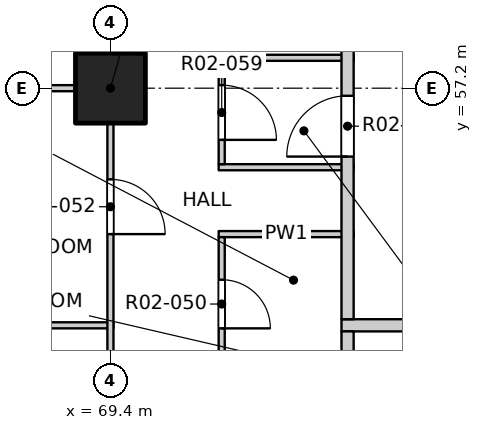
"""IFC4 building model, lengths in metres.
Left out: names, types, materials, properties, quantities, classifications, styles, units other than length and angle.
Written with IfcOpenShell. Run it as: python <this file> out.ifc"""

import sys

from ifc_helpers import new_model, si_unit, direction, frame, frame_2d, origin, origin_2d, place, context, subcontext, project, spatial, rectangle, extrude, element, fill, save


model = new_model("IFC4")
c1 = context("Model", 3, precision=1e-05, world=origin(), true_north=direction((0.0, 1.0)))
c2 = subcontext(c1, "Body", "Model", "MODEL_VIEW")
j1 = project(units=[si_unit("LENGTHUNIT", "METRE"), si_unit("PLANEANGLEUNIT", "RADIAN")], contexts=[c1])
p1 = place(None, origin())
s1 = spatial("IfcSite", under=j1, at=p1, CompositionType="ELEMENT")
p2 = place(p1, origin())
s2 = spatial("IfcBuilding", under=s1, at=p2, CompositionType="ELEMENT")
p3 = place(p2, frame((0.0, 0.0, 36.5)))
s3 = spatial("IfcBuildingStorey", under=s2, at=p3, CompositionType="ELEMENT", Elevation=36.5)
p4 = place(p3, frame((69.4, 57.2, -0.25), z_axis=(0.0, 0.0, 1.0), x_axis=(1.0, 0.0, 0.0)))
e1 = element("IfcColumn", 1, at=p4, inside=s3, PredefinedType="COLUMN", context=c2, shape_type="SweptSolid", body=[
    extrude(rectangle(XDim=1.15, YDim=1.15, at=origin_2d()), origin(), (0.0, 0.0, 1.0), 3.4),
])
p5 = place(p3, frame((61.9, 53.3, 0.0), z_axis=(0.0, 0.0, 1.0), x_axis=(1.0, 0.0, 0.0)))
e2 = element("IfcWall", 2, at=p5, inside=s3, PredefinedType="PARTITIONING", context=c2, shape_type="SweptSolid", body=[
    extrude(rectangle(XDim=7.55, YDim=0.1, at=frame_2d((3.775, 0.0))), origin(), (0.0, 0.0, 1.0), 3.15),
])
p6 = place(p3, frame((73.2, 53.3, 0.0), z_axis=(0.0, 0.0, 1.0), x_axis=(1.0, 0.0, 0.0)))
e3 = element("IfcWall", 3, at=p6, inside=s3, PredefinedType="PARTITIONING", context=c2, shape_type="SweptSolid", body=[
    extrude(rectangle(XDim=23.6, YDim=0.2, at=frame_2d((11.8, 0.0))), origin(), (0.0, 0.0, 1.0), 3.15),
])
p7 = place(p6, frame((5.925, 0.0, 0.0)))
e4 = element("IfcOpeningElement", 4, at=p7, cuts=e3, PredefinedType="OPENING", context=c2, shape_type="SweptSolid", body=[
    extrude(rectangle(XDim=1.0, YDim=2.1, at=frame_2d((0.5, 1.05))), frame((0.0, 0.11, 0.0), z_axis=(0.0, -1.0, 0.0), x_axis=(1.0, 0.0, 0.0)), (0.0, 0.0, 1.0), 0.22),
])
p8 = place(p6, frame((17.925, 0.0, 0.0)))
e5 = element("IfcOpeningElement", 5, at=p8, cuts=e3, PredefinedType="OPENING", context=c2, shape_type="SweptSolid", body=[
    extrude(rectangle(XDim=1.0, YDim=2.1, at=frame_2d((0.5, 1.05))), frame((0.0, 0.11, 0.0), z_axis=(0.0, -1.0, 0.0), x_axis=(1.0, 0.0, 0.0)), (0.0, 0.0, 1.0), 0.22),
])
for number, where, z_axis, x_axis in (
    (6, (71.18, 54.8, 0.0), (0.0, 0.0, 1.0), (1.0, 0.0, 0.0)),
    (7, (71.18, 55.9, 0.0), (0.0, 0.0, 1.0), (1.0, 0.0, 0.0)),
):
    element("IfcWall", number, at=place(p3, frame(where, z_axis=z_axis, x_axis=x_axis)), inside=s3, PredefinedType="PARTITIONING", context=c2, shape_type="SweptSolid", body=[
        extrude(rectangle(XDim=2.22, YDim=0.1, at=frame_2d((1.11, 0.0))), origin(), (0.0, 0.0, 1.0), 3.15),
    ])
p9 = place(p3, frame((61.9, 57.2, 0.0), z_axis=(0.0, 0.0, 1.0), x_axis=(1.0, 0.0, 0.0)))
e8 = element("IfcWall", 8, at=p9, inside=s3, PredefinedType="PARTITIONING", context=c2, shape_type="SweptSolid", body=[
    extrude(rectangle(XDim=7.55, YDim=0.1, at=frame_2d((3.775, 0.0))), origin(), (0.0, 0.0, 1.0), 2.55),
])
p10 = place(p3, frame((71.18, 57.7, 0.0), z_axis=(0.0, 0.0, 1.0), x_axis=(1.0, 0.0, 0.0)))
e9 = element("IfcWall", 9, at=p10, inside=s3, PredefinedType="PARTITIONING", context=c2, shape_type="SweptSolid", body=[
    extrude(rectangle(XDim=2.22, YDim=0.1, at=frame_2d((1.11, 0.0))), origin(), (0.0, 0.0, 1.0), 3.15),
])
p11 = place(p3, frame((69.4, 41.9, 0.0), z_axis=(0.0, 0.0, 1.0), x_axis=(0.0, 1.0, 0.0)))
e10 = element("IfcWall", 10, at=p11, inside=s3, PredefinedType="PARTITIONING", context=c2, shape_type="SweptSolid", body=[
    extrude(rectangle(XDim=46.2, YDim=0.1, at=frame_2d((23.1, 0.0))), origin(), (0.0, 0.0, 1.0), 3.15),
])
p12 = place(p11, frame((1.2, 0.0, 0.0)))
e11 = element("IfcOpeningElement", 11, at=p12, cuts=e10, PredefinedType="OPENING", context=c2, shape_type="SweptSolid", body=[
    extrude(rectangle(XDim=0.9, YDim=2.1, at=frame_2d((0.45, 1.05))), frame((0.0, 0.06, 0.0), z_axis=(0.0, -1.0, 0.0), x_axis=(1.0, 0.0, 0.0)), (0.0, 0.0, 1.0), 0.12),
])
p13 = place(p11, frame((5.1, 0.0, 0.0)))
e12 = element("IfcOpeningElement", 12, at=p13, cuts=e10, PredefinedType="OPENING", context=c2, shape_type="SweptSolid", body=[
    extrude(rectangle(XDim=0.9, YDim=2.1, at=frame_2d((0.45, 1.05))), frame((0.0, 0.06, 0.0), z_axis=(0.0, -1.0, 0.0), x_axis=(1.0, 0.0, 0.0)), (0.0, 0.0, 1.0), 0.12),
])
p14 = place(p11, frame((9.975, 0.0, 0.0)))
e13 = element("IfcOpeningElement", 13, at=p14, cuts=e10, PredefinedType="OPENING", context=c2, shape_type="SweptSolid", body=[
    extrude(rectangle(XDim=0.9, YDim=2.1, at=frame_2d((0.45, 1.05))), frame((0.0, 0.06, 0.0), z_axis=(0.0, -1.0, 0.0), x_axis=(1.0, 0.0, 0.0)), (0.0, 0.0, 1.0), 0.12),
])
p15 = place(p11, frame((12.9, 0.0, 0.0)))
e14 = element("IfcOpeningElement", 14, at=p15, cuts=e10, PredefinedType="OPENING", context=c2, shape_type="SweptSolid", body=[
    extrude(rectangle(XDim=0.9, YDim=2.1, at=frame_2d((0.45, 1.05))), frame((0.0, 0.06, 0.0), z_axis=(0.0, -1.0, 0.0), x_axis=(1.0, 0.0, 0.0)), (0.0, 0.0, 1.0), 0.12),
])
p16 = place(p11, frame((17.775, 0.0, 0.0)))
e15 = element("IfcOpeningElement", 15, at=p16, cuts=e10, PredefinedType="OPENING", context=c2, shape_type="SweptSolid", body=[
    extrude(rectangle(XDim=0.9, YDim=2.1, at=frame_2d((0.45, 1.05))), frame((0.0, 0.06, 0.0), z_axis=(0.0, -1.0, 0.0), x_axis=(1.0, 0.0, 0.0)), (0.0, 0.0, 1.0), 0.12),
])
p17 = place(p11, frame((21.5, 0.0, 0.0)))
e16 = element("IfcOpeningElement", 16, at=p17, cuts=e10, PredefinedType="OPENING", context=c2, shape_type="SweptSolid", body=[
    extrude(rectangle(XDim=0.9, YDim=2.1, at=frame_2d((0.45, 1.05))), frame((0.0, 0.06, 0.0), z_axis=(0.0, -1.0, 0.0), x_axis=(1.0, 0.0, 0.0)), (0.0, 0.0, 1.0), 0.12),
])
p18 = place(p11, frame((24.6, 0.0, 0.0)))
e17 = element("IfcOpeningElement", 17, at=p18, cuts=e10, PredefinedType="OPENING", context=c2, shape_type="SweptSolid", body=[
    extrude(rectangle(XDim=0.9, YDim=2.1, at=frame_2d((0.45, 1.05))), frame((0.0, 0.06, 0.0), z_axis=(0.0, -1.0, 0.0), x_axis=(1.0, 0.0, 0.0)), (0.0, 0.0, 1.0), 0.12),
])
p19 = place(p11, frame((29.3, 0.0, 0.0)))
e18 = element("IfcOpeningElement", 18, at=p19, cuts=e10, PredefinedType="OPENING", context=c2, shape_type="SweptSolid", body=[
    extrude(rectangle(XDim=0.9, YDim=2.1, at=frame_2d((0.45, 1.05))), frame((0.0, 0.06, 0.0), z_axis=(0.0, -1.0, 0.0), x_axis=(1.0, 0.0, 0.0)), (0.0, 0.0, 1.0), 0.12),
])
p20 = place(p11, frame((33.375, 0.0, 0.0)))
e19 = element("IfcOpeningElement", 19, at=p20, cuts=e10, PredefinedType="OPENING", context=c2, shape_type="SweptSolid", body=[
    extrude(rectangle(XDim=0.9, YDim=2.1, at=frame_2d((0.45, 1.05))), frame((0.0, 0.06, 0.0), z_axis=(0.0, -1.0, 0.0), x_axis=(1.0, 0.0, 0.0)), (0.0, 0.0, 1.0), 0.12),
])
p21 = place(p11, frame((37.1, 0.0, 0.0)))
e20 = element("IfcOpeningElement", 20, at=p21, cuts=e10, PredefinedType="OPENING", context=c2, shape_type="SweptSolid", body=[
    extrude(rectangle(XDim=0.9, YDim=2.1, at=frame_2d((0.45, 1.05))), frame((0.0, 0.06, 0.0), z_axis=(0.0, -1.0, 0.0), x_axis=(1.0, 0.0, 0.0)), (0.0, 0.0, 1.0), 0.12),
])
p22 = place(p11, frame((41.175, 0.0, 0.0)))
e21 = element("IfcOpeningElement", 21, at=p22, cuts=e10, PredefinedType="OPENING", context=c2, shape_type="SweptSolid", body=[
    extrude(rectangle(XDim=0.9, YDim=2.1, at=frame_2d((0.45, 1.05))), frame((0.0, 0.06, 0.0), z_axis=(0.0, -1.0, 0.0), x_axis=(1.0, 0.0, 0.0)), (0.0, 0.0, 1.0), 0.12),
])
p23 = place(p11, frame((44.1, 0.0, 0.0)))
e22 = element("IfcOpeningElement", 22, at=p23, cuts=e10, PredefinedType="OPENING", context=c2, shape_type="SweptSolid", body=[
    extrude(rectangle(XDim=0.9, YDim=2.1, at=frame_2d((0.45, 1.05))), frame((0.0, 0.06, 0.0), z_axis=(0.0, -1.0, 0.0), x_axis=(1.0, 0.0, 0.0)), (0.0, 0.0, 1.0), 0.12),
])
p24 = place(p3, frame((71.23, 45.55, 0.0), z_axis=(0.0, 0.0, 1.0), x_axis=(0.0, 1.0, 0.0)))
e23 = element("IfcWall", 23, at=p24, inside=s3, PredefinedType="PARTITIONING", context=c2, shape_type="SweptSolid", body=[
    extrude(rectangle(XDim=9.2, YDim=0.1, at=frame_2d((4.6, 0.0))), origin(), (0.0, 0.0, 1.0), 3.15),
])
p25 = place(p24, frame((0.7, 0.0, 0.0)))
e24 = element("IfcOpeningElement", 24, at=p25, cuts=e23, PredefinedType="OPENING", context=c2, shape_type="SweptSolid", body=[
    extrude(rectangle(XDim=0.9, YDim=2.1, at=frame_2d((0.45, 1.05))), frame((0.0, 0.06, 0.0), z_axis=(0.0, -1.0, 0.0), x_axis=(1.0, 0.0, 0.0)), (0.0, 0.0, 1.0), 0.12),
])
p26 = place(p24, frame((3.1, 0.0, 0.0)))
e25 = element("IfcOpeningElement", 25, at=p26, cuts=e23, PredefinedType="OPENING", context=c2, shape_type="SweptSolid", body=[
    extrude(rectangle(XDim=0.8, YDim=2.1, at=frame_2d((0.4, 1.05))), frame((0.0, 0.06, 0.0), z_axis=(0.0, -1.0, 0.0), x_axis=(1.0, 0.0, 0.0)), (0.0, 0.0, 1.0), 0.12),
])
p27 = place(p24, frame((5.4, 0.0, 0.0)))
e26 = element("IfcOpeningElement", 26, at=p27, cuts=e23, PredefinedType="OPENING", context=c2, shape_type="SweptSolid", body=[
    extrude(rectangle(XDim=0.8, YDim=2.1, at=frame_2d((0.4, 1.05))), frame((0.0, 0.06, 0.0), z_axis=(0.0, -1.0, 0.0), x_axis=(1.0, 0.0, 0.0)), (0.0, 0.0, 1.0), 0.12),
])
p28 = place(p24, frame((7.7, 0.0, 0.0)))
e27 = element("IfcOpeningElement", 27, at=p28, cuts=e23, PredefinedType="OPENING", context=c2, shape_type="SweptSolid", body=[
    extrude(rectangle(XDim=0.8, YDim=2.1, at=frame_2d((0.4, 1.05))), frame((0.0, 0.06, 0.0), z_axis=(0.0, -1.0, 0.0), x_axis=(1.0, 0.0, 0.0)), (0.0, 0.0, 1.0), 0.12),
])
p29 = place(p3, frame((71.23, 55.95, 0.0), z_axis=(0.0, 0.0, 1.0), x_axis=(0.0, 1.0, 0.0)))
e28 = element("IfcWall", 28, at=p29, inside=s3, PredefinedType="PARTITIONING", context=c2, shape_type="SweptSolid", body=[
    extrude(rectangle(XDim=14.25, YDim=0.1, at=frame_2d((7.125, 0.0))), origin(), (0.0, 0.0, 1.0), 3.15),
])
p30 = place(p29, frame((0.4, 0.0, 0.0)))
e29 = element("IfcOpeningElement", 29, at=p30, cuts=e28, PredefinedType="OPENING", context=c2, shape_type="SweptSolid", body=[
    extrude(rectangle(XDim=0.9, YDim=2.1, at=frame_2d((0.45, 1.05))), frame((0.0, 0.06, 0.0), z_axis=(0.0, -1.0, 0.0), x_axis=(1.0, 0.0, 0.0)), (0.0, 0.0, 1.0), 0.12),
])
p31 = place(p29, frame((3.0, 0.0, 0.0)))
e30 = element("IfcOpeningElement", 30, at=p31, cuts=e28, PredefinedType="OPENING", context=c2, shape_type="SweptSolid", body=[
    extrude(rectangle(XDim=0.9, YDim=2.1, at=frame_2d((0.45, 1.05))), frame((0.0, 0.06, 0.0), z_axis=(0.0, -1.0, 0.0), x_axis=(1.0, 0.0, 0.0)), (0.0, 0.0, 1.0), 0.12),
])
p32 = place(p29, frame((5.825, 0.0, 0.0)))
e31 = element("IfcOpeningElement", 31, at=p32, cuts=e28, PredefinedType="OPENING", context=c2, shape_type="SweptSolid", body=[
    extrude(rectangle(XDim=0.8, YDim=2.1, at=frame_2d((0.4, 1.05))), frame((0.0, 0.06, 0.0), z_axis=(0.0, -1.0, 0.0), x_axis=(1.0, 0.0, 0.0)), (0.0, 0.0, 1.0), 0.12),
])
p33 = place(p29, frame((8.05, 0.0, 0.0)))
e32 = element("IfcOpeningElement", 32, at=p33, cuts=e28, PredefinedType="OPENING", context=c2, shape_type="SweptSolid", body=[
    extrude(rectangle(XDim=0.8, YDim=2.1, at=frame_2d((0.4, 1.05))), frame((0.0, 0.06, 0.0), z_axis=(0.0, -1.0, 0.0), x_axis=(1.0, 0.0, 0.0)), (0.0, 0.0, 1.0), 0.12),
])
p34 = place(p29, frame((10.35, 0.0, 0.0)))
e33 = element("IfcOpeningElement", 33, at=p34, cuts=e28, PredefinedType="OPENING", context=c2, shape_type="SweptSolid", body=[
    extrude(rectangle(XDim=0.8, YDim=2.1, at=frame_2d((0.4, 1.05))), frame((0.0, 0.06, 0.0), z_axis=(0.0, -1.0, 0.0), x_axis=(1.0, 0.0, 0.0)), (0.0, 0.0, 1.0), 0.12),
])
p35 = place(p29, frame((12.65, 0.0, 0.0)))
e34 = element("IfcOpeningElement", 34, at=p35, cuts=e28, PredefinedType="OPENING", context=c2, shape_type="SweptSolid", body=[
    extrude(rectangle(XDim=0.9, YDim=2.1, at=frame_2d((0.45, 1.05))), frame((0.0, 0.06, 0.0), z_axis=(0.0, -1.0, 0.0), x_axis=(1.0, 0.0, 0.0)), (0.0, 0.0, 1.0), 0.12),
])
p36 = place(p3, frame((73.3, 41.9, 0.0), z_axis=(0.0, 0.0, 1.0), x_axis=(0.0, 1.0, 0.0)))
e35 = element("IfcWall", 35, at=p36, inside=s3, PredefinedType="PARTITIONING", context=c2, shape_type="SweptSolid", body=[
    extrude(rectangle(XDim=11.3, YDim=0.2, at=frame_2d((5.65, 0.0))), origin(), (0.0, 0.0, 1.0), 3.15),
])
p37 = place(p3, frame((73.3, 53.4, 0.0), z_axis=(0.0, 0.0, 1.0), x_axis=(0.0, 1.0, 0.0)))
e36 = element("IfcWall", 36, at=p37, inside=s3, PredefinedType="PARTITIONING", context=c2, shape_type="SweptSolid", body=[
    extrude(rectangle(XDim=31.0, YDim=0.2, at=frame_2d((15.5, 0.0))), origin(), (0.0, 0.0, 1.0), 3.15),
])
p38 = place(p37, frame((2.675, 0.0, 0.0)))
e37 = element("IfcOpeningElement", 37, at=p38, cuts=e36, PredefinedType="OPENING", context=c2, shape_type="SweptSolid", body=[
    extrude(rectangle(XDim=1.0, YDim=2.1, at=frame_2d((0.5, 1.05))), frame((0.0, 0.11, 0.0), z_axis=(0.0, -1.0, 0.0), x_axis=(1.0, 0.0, 0.0)), (0.0, 0.0, 1.0), 0.22),
])
p39 = place(p37, frame((18.125, 0.0, 0.0)))
e38 = element("IfcOpeningElement", 38, at=p39, cuts=e36, PredefinedType="OPENING", context=c2, shape_type="SweptSolid", body=[
    extrude(rectangle(XDim=1.0, YDim=2.1, at=frame_2d((0.5, 1.05))), frame((0.0, 0.11, 0.0), z_axis=(0.0, -1.0, 0.0), x_axis=(1.0, 0.0, 0.0)), (0.0, 0.0, 1.0), 0.22),
])
p40 = place(p37, frame((26.025, 0.0, 0.0)))
e39 = element("IfcOpeningElement", 39, at=p40, cuts=e36, PredefinedType="OPENING", context=c2, shape_type="SweptSolid", body=[
    extrude(rectangle(XDim=1.0, YDim=2.1, at=frame_2d((0.5, 1.05))), frame((0.0, 0.11, 0.0), z_axis=(0.0, -1.0, 0.0), x_axis=(1.0, 0.0, 0.0)), (0.0, 0.0, 1.0), 0.22),
])
p41 = place(p28, origin())
e40 = element("IfcDoor", 40, at=p41, inside=s3, OperationType="SINGLE_SWING_RIGHT", PredefinedType="DOOR", context=c2, shape_type="SweptSolid", body=[
    extrude(rectangle(XDim=0.8, YDim=2.1, at=frame_2d((0.4, 1.05))), frame((0.0, 0.025, 0.0), z_axis=(0.0, -1.0, 0.0), x_axis=(1.0, 0.0, 0.0)), (0.0, 0.0, 1.0), 0.05),
])
fill(e27, e40)
p42 = place(p15, origin())
e41 = element("IfcDoor", 41, at=p42, inside=s3, OperationType="SINGLE_SWING_RIGHT", PredefinedType="DOOR", context=c2, shape_type="SweptSolid", body=[
    extrude(rectangle(XDim=0.9, YDim=2.1, at=frame_2d((0.45, 1.05))), frame((0.0, 0.025, 0.0), z_axis=(0.0, -1.0, 0.0), x_axis=(1.0, 0.0, 0.0)), (0.0, 0.0, 1.0), 0.05),
])
fill(e14, e41)
p43 = place(p38, origin())
e42 = element("IfcDoor", 42, at=p43, inside=s3, OperationType="SINGLE_SWING_RIGHT", PredefinedType="DOOR", context=c2, shape_type="SweptSolid", body=[
    extrude(rectangle(XDim=1.0, YDim=2.1, at=frame_2d((0.5, 1.05))), frame((0.0, 0.025, 0.0), z_axis=(0.0, -1.0, 0.0), x_axis=(1.0, 0.0, 0.0)), (0.0, 0.0, 1.0), 0.05),
])
fill(e37, e42)
p44 = place(p30, origin())
e43 = element("IfcDoor", 43, at=p44, inside=s3, OperationType="SINGLE_SWING_RIGHT", PredefinedType="DOOR", context=c2, shape_type="SweptSolid", body=[
    extrude(rectangle(XDim=0.9, YDim=2.1, at=frame_2d((0.45, 1.05))), frame((0.0, 0.025, 0.0), z_axis=(0.0, -1.0, 0.0), x_axis=(1.0, 0.0, 0.0)), (0.0, 0.0, 1.0), 0.05),
])
fill(e29, e43)
save(model, sys.argv[1])
